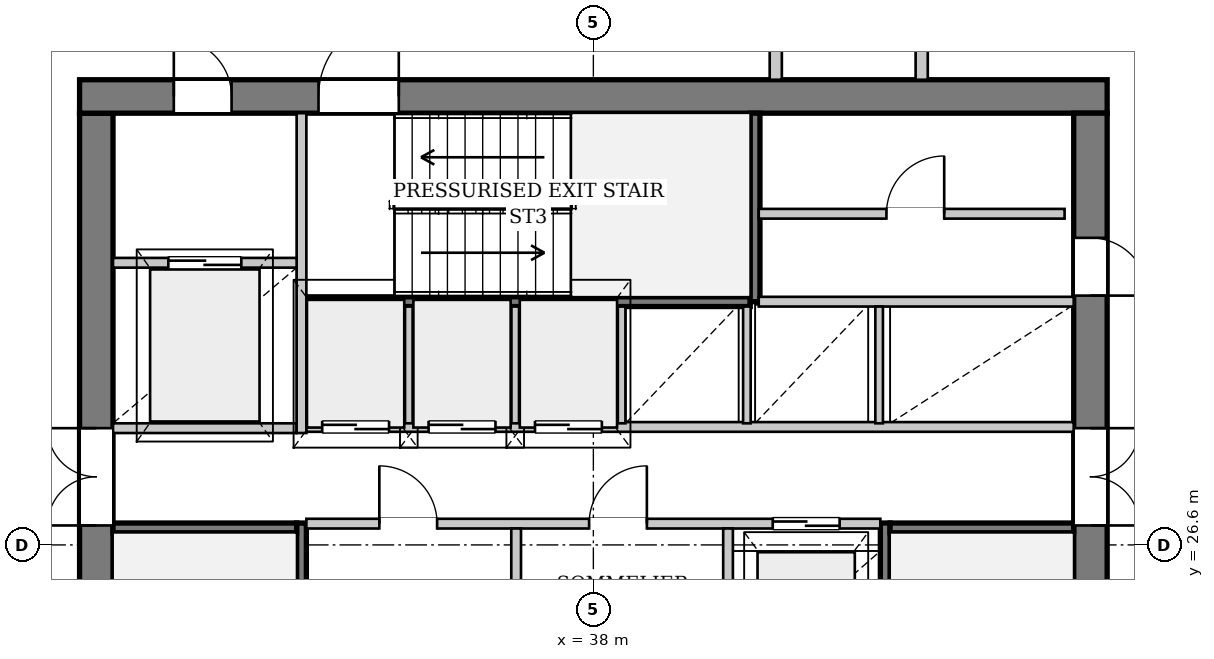
"""IFC4 building model, lengths in metres.
Left out: names, types, materials, properties, quantities, classifications, styles, units other than length and angle.
Written with IfcOpenShell. Run it as: python <this file> out.ifc"""

import sys

from ifc_helpers import new_model, si_unit, direction, frame, frame_2d, origin, place, context, subcontext, project, spatial, rectangle, extrude, source, transform, mapped, element, fill, save


model = new_model("IFC4")
c1 = context("Model", 3, precision=1e-05, world=origin(), true_north=direction((0.0, 1.0)))
c2 = subcontext(c1, "Body", "Model", "MODEL_VIEW")
j1 = project(units=[si_unit("LENGTHUNIT", "METRE"), si_unit("PLANEANGLEUNIT", "RADIAN")], contexts=[c1])
p1 = place(None, origin())
s1 = spatial("IfcSite", under=j1, at=p1, CompositionType="ELEMENT")
p2 = place(p1, origin())
s2 = spatial("IfcBuilding", under=s1, at=p2, CompositionType="ELEMENT")
p3 = place(p2, frame((0.0, 0.0, 146.6)))
s3 = spatial("IfcBuildingStorey", under=s2, at=p3, CompositionType="ELEMENT", Elevation=146.6)
p4 = place(p3, frame((29.825, 19.5, 0.0), z_axis=(0.0, 0.0, 1.0), x_axis=(0.0, 1.0, 0.0)))
e1 = element("IfcWall", 1, at=p4, inside=s3, PredefinedType="SHEAR", context=c2, shape_type="SweptSolid", body=[
    extrude(rectangle(XDim=14.2, YDim=0.55, at=frame_2d((7.1, 0.0))), origin(), (0.0, 0.0, 1.0), 3.3),
])
p5 = place(p4, frame((7.42, 0.0, 0.0)))
e2 = element("IfcOpeningElement", 2, at=p5, cuts=e1, PredefinedType="OPENING", context=c2, shape_type="SweptSolid", body=[
    extrude(rectangle(XDim=1.6, YDim=2.2, at=frame_2d((0.8, 1.1))), frame((0.0, 0.285, 0.0), z_axis=(0.0, -1.0, 0.0), x_axis=(1.0, 0.0, 0.0)), (0.0, 0.0, 1.0), 0.57),
])
p6 = place(p3, frame((29.55, 33.975, 0.0), z_axis=(0.0, 0.0, 1.0), x_axis=(1.0, 0.0, 0.0)))
e3 = element("IfcWall", 3, at=p6, inside=s3, PredefinedType="SHEAR", context=c2, shape_type="SweptSolid", body=[
    extrude(rectangle(XDim=16.9, YDim=0.55, at=frame_2d((8.45, 0.0))), origin(), (0.0, 0.0, 1.0), 3.3),
])
p7 = place(p6, frame((1.55, 0.0, 0.0)))
e4 = element("IfcOpeningElement", 4, at=p7, cuts=e3, PredefinedType="OPENING", context=c2, shape_type="SweptSolid", body=[
    extrude(rectangle(XDim=0.95, YDim=2.1, at=frame_2d((0.475, 1.05))), frame((0.0, 0.285, 0.0), z_axis=(0.0, -1.0, 0.0), x_axis=(1.0, 0.0, 0.0)), (0.0, 0.0, 1.0), 0.57),
])
p8 = place(p6, frame((3.93, 0.0, 0.0)))
e5 = element("IfcOpeningElement", 5, at=p8, cuts=e3, PredefinedType="OPENING", context=c2, shape_type="SweptSolid", body=[
    extrude(rectangle(XDim=1.32, YDim=2.2, at=frame_2d((0.66, 1.1))), frame((0.0, 0.285, 0.0), z_axis=(0.0, -1.0, 0.0), x_axis=(1.0, 0.0, 0.0)), (0.0, 0.0, 1.0), 0.57),
])
p9 = place(p3, frame((46.175, 33.7, 0.0), z_axis=(0.0, 0.0, 1.0), x_axis=(0.0, -1.0, 0.0)))
e6 = element("IfcWall", 6, at=p9, inside=s3, PredefinedType="SHEAR", context=c2, shape_type="SweptSolid", body=[
    extrude(rectangle(XDim=14.2, YDim=0.55, at=frame_2d((7.1, 0.0))), origin(), (0.0, 0.0, 1.0), 3.3),
])
p10 = place(p9, frame((5.18, 0.0, 0.0)))
e7 = element("IfcOpeningElement", 7, at=p10, cuts=e6, PredefinedType="OPENING", context=c2, shape_type="SweptSolid", body=[
    extrude(rectangle(XDim=1.6, YDim=2.2, at=frame_2d((0.8, 1.1))), frame((0.0, 0.285, 0.0), z_axis=(0.0, -1.0, 0.0), x_axis=(1.0, 0.0, 0.0)), (0.0, 0.0, 1.0), 0.57),
])
p11 = place(p9, frame((2.05, 0.0, 0.0)))
e8 = element("IfcOpeningElement", 8, at=p11, cuts=e6, PredefinedType="OPENING", context=c2, shape_type="SweptSolid", body=[
    extrude(rectangle(XDim=0.95, YDim=2.1, at=frame_2d((0.475, 1.05))), frame((0.0, 0.285, 0.0), z_axis=(0.0, -1.0, 0.0), x_axis=(1.0, 0.0, 0.0)), (0.0, 0.0, 1.0), 0.57),
])
p12 = place(p3, frame((33.2, 19.5, 0.0), z_axis=(0.0, 0.0, 1.0), x_axis=(0.0, 1.0, 0.0)))
e9 = element("IfcWall", 9, at=p12, inside=s3, PredefinedType="PARTITIONING", context=c2, shape_type="SweptSolid", body=[
    extrude(rectangle(XDim=7.46, YDim=0.16, at=frame_2d((3.73, 0.0))), origin(), (0.0, 0.0, 1.0), 3.3),
])
p13 = place(p12, frame((0.08, 0.0, 0.0)))
e10 = element("IfcOpeningElement", 10, at=p13, cuts=e9, PredefinedType="OPENING", context=c2, shape_type="SweptSolid", body=[
    extrude(rectangle(XDim=1.32, YDim=2.2, at=frame_2d((0.66, 1.1))), frame((0.0, 0.09, 0.0), z_axis=(0.0, -1.0, 0.0), x_axis=(1.0, 0.0, 0.0)), (0.0, 0.0, 1.0), 0.18),
])
p14 = place(p3, frame((30.1, 26.88, 0.0), z_axis=(0.0, 0.0, 1.0), x_axis=(1.0, 0.0, 0.0)))
e11 = element("IfcWall", 11, at=p14, inside=s3, PredefinedType="PARTITIONING", context=c2, shape_type="SweptSolid", body=[
    extrude(rectangle(XDim=3.02, YDim=0.16, at=frame_2d((1.51, 0.0))), origin(), (0.0, 0.0, 1.0), 3.3),
])
p15 = place(p3, frame((42.8, 26.96, 0.0), z_axis=(0.0, 0.0, 1.0), x_axis=(0.0, -1.0, 0.0)))
e12 = element("IfcWall", 12, at=p15, inside=s3, PredefinedType="PARTITIONING", context=c2, shape_type="SweptSolid", body=[
    extrude(rectangle(XDim=7.46, YDim=0.16, at=frame_2d((3.73, 0.0))), origin(), (0.0, 0.0, 1.0), 3.3),
])
p16 = place(p15, frame((6.06, 0.0, 0.0)))
e13 = element("IfcOpeningElement", 13, at=p16, cuts=e12, PredefinedType="OPENING", context=c2, shape_type="SweptSolid", body=[
    extrude(rectangle(XDim=1.32, YDim=2.2, at=frame_2d((0.66, 1.1))), frame((0.0, 0.09, 0.0), z_axis=(0.0, -1.0, 0.0), x_axis=(1.0, 0.0, 0.0)), (0.0, 0.0, 1.0), 0.18),
])
p17 = place(p3, frame((42.88, 26.88, 0.0), z_axis=(0.0, 0.0, 1.0), x_axis=(1.0, 0.0, 0.0)))
e14 = element("IfcWall", 14, at=p17, inside=s3, PredefinedType="PARTITIONING", context=c2, shape_type="SweptSolid", body=[
    extrude(rectangle(XDim=3.02, YDim=0.16, at=frame_2d((1.51, 0.0))), origin(), (0.0, 0.0, 1.0), 3.3),
])
p18 = place(p3, frame((33.28, 30.6, 0.0), z_axis=(0.0, 0.0, 1.0), x_axis=(1.0, 0.0, 0.0)))
e15 = element("IfcWall", 15, at=p18, inside=s3, PredefinedType="PARTITIONING", context=c2, shape_type="SweptSolid", body=[
    extrude(rectangle(XDim=7.3, YDim=0.16, at=frame_2d((3.65, 0.0))), origin(), (0.0, 0.0, 1.0), 3.3),
])
p19 = place(p3, frame((40.66, 30.6, 0.0), z_axis=(0.0, 0.0, 1.0), x_axis=(0.0, 1.0, 0.0)))
e16 = element("IfcWall", 16, at=p19, inside=s3, PredefinedType="PARTITIONING", context=c2, shape_type="SweptSolid", body=[
    extrude(rectangle(XDim=3.1, YDim=0.16, at=frame_2d((1.55, 0.0))), origin(), (0.0, 0.0, 1.0), 3.3),
])
p20 = place(p3, frame((30.1, 28.52, 0.0), z_axis=(0.0, 0.0, 1.0), x_axis=(1.0, 0.0, 0.0)))
e17 = element("IfcWall", 17, at=p20, inside=s3, PredefinedType="PARTITIONING", context=c2, shape_type="SweptSolid", body=[
    extrude(rectangle(XDim=3.02, YDim=0.16, at=frame_2d((1.51, 0.0))), origin(), (0.0, 0.0, 1.0), 3.3),
])
p21 = place(p3, frame((33.2, 28.44, 0.0), z_axis=(0.0, 0.0, 1.0), x_axis=(0.0, 1.0, 0.0)))
e18 = element("IfcWall", 18, at=p21, inside=s3, PredefinedType="PARTITIONING", context=c2, shape_type="SweptSolid", body=[
    extrude(rectangle(XDim=5.26, YDim=0.16, at=frame_2d((2.63, 0.0))), origin(), (0.0, 0.0, 1.0), 3.3),
])
p22 = place(p3, frame((30.1, 31.24, 0.0), z_axis=(0.0, 0.0, 1.0), x_axis=(1.0, 0.0, 0.0)))
e19 = element("IfcWall", 19, at=p22, inside=s3, PredefinedType="PARTITIONING", context=c2, shape_type="SweptSolid", body=[
    extrude(rectangle(XDim=3.02, YDim=0.16, at=frame_2d((1.51, 0.0))), origin(), (0.0, 0.0, 1.0), 3.3),
])
p23 = place(p22, frame((0.91, 0.0, 0.0)))
e20 = element("IfcOpeningElement", 20, at=p23, cuts=e19, PredefinedType="OPENING", context=c2, shape_type="SweptSolid", body=[
    extrude(rectangle(XDim=1.2, YDim=2.2, at=frame_2d((0.6, 1.1))), frame((0.0, 0.09, 0.0), z_axis=(0.0, -1.0, 0.0), x_axis=(1.0, 0.0, 0.0)), (0.0, 0.0, 1.0), 0.18),
])
p24 = place(p3, frame((33.28, 26.95, 0.0), z_axis=(0.0, 0.0, 1.0), x_axis=(1.0, 0.0, 0.0)))
e21 = element("IfcWall", 21, at=p24, inside=s3, PredefinedType="PARTITIONING", context=c2, shape_type="SweptSolid", body=[
    extrude(rectangle(XDim=9.44, YDim=0.16, at=frame_2d((4.72, 0.0))), origin(), (0.0, 0.0, 1.0), 3.3),
])
p25 = place(p24, frame((1.2, 0.0, 0.0)))
e22 = element("IfcOpeningElement", 22, at=p25, cuts=e21, PredefinedType="OPENING", context=c2, shape_type="SweptSolid", body=[
    extrude(rectangle(XDim=0.95, YDim=2.1, at=frame_2d((0.475, 1.05))), frame((0.0, 0.09, 0.0), z_axis=(0.0, -1.0, 0.0), x_axis=(1.0, 0.0, 0.0)), (0.0, 0.0, 1.0), 0.18),
])
p26 = place(p24, frame((4.65, 0.0, 0.0)))
e23 = element("IfcOpeningElement", 23, at=p26, cuts=e21, PredefinedType="OPENING", context=c2, shape_type="SweptSolid", body=[
    extrude(rectangle(XDim=0.95, YDim=2.1, at=frame_2d((0.475, 1.05))), frame((0.0, 0.09, 0.0), z_axis=(0.0, -1.0, 0.0), x_axis=(1.0, 0.0, 0.0)), (0.0, 0.0, 1.0), 0.18),
])
p27 = place(p24, frame((7.67, 0.0, 0.0)))
e24 = element("IfcOpeningElement", 24, at=p27, cuts=e21, PredefinedType="OPENING", context=c2, shape_type="SweptSolid", body=[
    extrude(rectangle(XDim=1.1, YDim=2.2, at=frame_2d((0.55, 1.1))), frame((0.0, 0.09, 0.0), z_axis=(0.0, -1.0, 0.0), x_axis=(1.0, 0.0, 0.0)), (0.0, 0.0, 1.0), 0.18),
])
for number, where, z_axis, x_axis in (
    (25, (36.73, 24.56, 0.0), (0.0, 0.0, 1.0), (0.0, 1.0, 0.0)),
    (26, (40.215, 24.56, 0.0), (0.0, 0.0, 1.0), (0.0, 1.0, 0.0)),
):
    element("IfcWall", number, at=place(p3, frame(where, z_axis=z_axis, x_axis=x_axis)), inside=s3, PredefinedType="PARTITIONING", context=c2, shape_type="SweptSolid", body=[
        extrude(rectangle(XDim=2.31, YDim=0.16, at=frame_2d((1.155, 0.0))), origin(), (0.0, 0.0, 1.0), 3.3),
    ])
p28 = place(p3, frame((33.28, 28.54, 0.0), z_axis=(0.0, 0.0, 1.0), x_axis=(1.0, 0.0, 0.0)))
e27 = element("IfcWall", 27, at=p28, inside=s3, PredefinedType="PARTITIONING", context=c2, shape_type="SweptSolid", body=[
    extrude(rectangle(XDim=12.62, YDim=0.16, at=frame_2d((6.31, 0.0))), origin(), (0.0, 0.0, 1.0), 3.3),
])
p29 = place(p28, frame((0.26, 0.0, 0.0)))
e28 = element("IfcOpeningElement", 28, at=p29, cuts=e27, PredefinedType="OPENING", context=c2, shape_type="SweptSolid", body=[
    extrude(rectangle(XDim=1.1, YDim=2.2, at=frame_2d((0.55, 1.1))), frame((0.0, 0.09, 0.0), z_axis=(0.0, -1.0, 0.0), x_axis=(1.0, 0.0, 0.0)), (0.0, 0.0, 1.0), 0.18),
])
p30 = place(p28, frame((2.01, 0.0, 0.0)))
e29 = element("IfcOpeningElement", 29, at=p30, cuts=e27, PredefinedType="OPENING", context=c2, shape_type="SweptSolid", body=[
    extrude(rectangle(XDim=1.1, YDim=2.2, at=frame_2d((0.55, 1.1))), frame((0.0, 0.09, 0.0), z_axis=(0.0, -1.0, 0.0), x_axis=(1.0, 0.0, 0.0)), (0.0, 0.0, 1.0), 0.18),
])
p31 = place(p28, frame((3.76, 0.0, 0.0)))
e30 = element("IfcOpeningElement", 30, at=p31, cuts=e27, PredefinedType="OPENING", context=c2, shape_type="SweptSolid", body=[
    extrude(rectangle(XDim=1.1, YDim=2.2, at=frame_2d((0.55, 1.1))), frame((0.0, 0.09, 0.0), z_axis=(0.0, -1.0, 0.0), x_axis=(1.0, 0.0, 0.0)), (0.0, 0.0, 1.0), 0.18),
])
p32 = place(p3, frame((40.72, 30.6, 0.0), z_axis=(0.0, 0.0, 1.0), x_axis=(1.0, 0.0, 0.0)))
e31 = element("IfcWall", 31, at=p32, inside=s3, PredefinedType="PARTITIONING", context=c2, shape_type="SweptSolid", body=[
    extrude(rectangle(XDim=5.18, YDim=0.16, at=frame_2d((2.59, 0.0))), origin(), (0.0, 0.0, 1.0), 3.3),
])
for number, where, z_axis, x_axis in (
    (32, (34.965, 28.6, 0.0), (0.0, 0.0, 1.0), (0.0, 1.0, 0.0)),
    (33, (36.715, 28.6, 0.0), (0.0, 0.0, 1.0), (0.0, 1.0, 0.0)),
    (34, (38.465, 28.6, 0.0), (0.0, 0.0, 1.0), (0.0, 1.0, 0.0)),
    (35, (40.525, 28.6, 0.0), (0.0, 0.0, 1.0), (0.0, 1.0, 0.0)),
    (36, (42.7, 28.6, 0.0), (0.0, 0.0, 1.0), (0.0, 1.0, 0.0)),
):
    element("IfcWall", number, at=place(p3, frame(where, z_axis=z_axis, x_axis=x_axis)), inside=s3, PredefinedType="PARTITIONING", context=c2, shape_type="SweptSolid", body=[
        extrude(rectangle(XDim=1.92, YDim=0.125, at=frame_2d((0.96, 0.0))), origin(), (0.0, 0.0, 1.0), 3.3),
    ])
p33 = place(p3, frame((40.72, 32.046, 0.0), z_axis=(0.0, 0.0, 1.0), x_axis=(1.0, 0.0, 0.0)))
e37 = element("IfcWall", 37, at=p33, inside=s3, PredefinedType="PARTITIONING", context=c2, shape_type="SweptSolid", body=[
    extrude(rectangle(XDim=5.03, YDim=0.16, at=frame_2d((2.515, 0.0))), origin(), (0.0, 0.0, 1.0), 3.3),
])
p34 = place(p33, frame((2.1, 0.0, 0.0)))
e38 = element("IfcOpeningElement", 38, at=p34, cuts=e37, PredefinedType="OPENING", context=c2, shape_type="SweptSolid", body=[
    extrude(rectangle(XDim=0.95, YDim=2.1, at=frame_2d((0.475, 1.05))), frame((0.0, 0.09, 0.0), z_axis=(0.0, -1.0, 0.0), x_axis=(1.0, 0.0, 0.0)), (0.0, 0.0, 1.0), 0.18),
])
for number, where, z_axis, x_axis in (
    (39, (41.0, 34.25, 0.0), (0.0, 0.0, 1.0), (0.0, 1.0, 0.0)),
    (40, (43.4, 34.25, 0.0), (0.0, 0.0, 1.0), (0.0, 1.0, 0.0)),
):
    element("IfcWall", number, at=place(p3, frame(where, z_axis=z_axis, x_axis=x_axis)), inside=s3, PredefinedType="PARTITIONING", context=c2, shape_type="SweptSolid", body=[
        extrude(rectangle(XDim=1.95, YDim=0.2, at=frame_2d((0.975, 0.0))), origin(), (0.0, 0.0, 1.0), 3.3),
    ])
m1 = source(origin(), c2, "Body", "SweptSolid", [
    extrude(rectangle(XDim=1.6, YDim=2.2, at=frame_2d((0.8, 1.1))), frame((0.0, 0.025, 0.0), z_axis=(0.0, -1.0, 0.0), x_axis=(1.0, 0.0, 0.0)), (0.0, 0.0, 1.0), 0.05),
])
p35 = place(p5, origin())
e41 = element("IfcDoor", 41, at=p35, inside=s3, OperationType="DOUBLE_DOOR_SINGLE_SWING", PredefinedType="DOOR", context=c2, shape_type="MappedRepresentation", body=[
    mapped(m1, transform((0.0, 0.0, 0.0), x_axis=(1.0, 0.0, 0.0), y_axis=(0.0, 1.0, 0.0), z_axis=(0.0, 0.0, 1.0), scale=1.0)),
])
fill(e2, e41)
m2 = source(origin(), c2, "Body", "SweptSolid", [
    extrude(rectangle(XDim=0.95, YDim=2.1, at=frame_2d((0.475, 1.05))), frame((0.0, 0.025, 0.0), z_axis=(0.0, -1.0, 0.0), x_axis=(1.0, 0.0, 0.0)), (0.0, 0.0, 1.0), 0.05),
])
p36 = place(p7, origin())
e42 = element("IfcDoor", 42, at=p36, inside=s3, OperationType="SINGLE_SWING_LEFT", PredefinedType="DOOR", context=c2, shape_type="MappedRepresentation", body=[
    mapped(m2, transform((0.0, 0.0, 0.0), x_axis=(1.0, 0.0, 0.0), y_axis=(0.0, 1.0, 0.0), z_axis=(0.0, 0.0, 1.0), scale=1.0)),
])
fill(e4, e42)
m3 = source(origin(), c2, "Body", "SweptSolid", [
    extrude(rectangle(XDim=1.32, YDim=2.2, at=frame_2d((0.66, 1.1))), frame((0.0, 0.025, 0.0), z_axis=(0.0, -1.0, 0.0), x_axis=(1.0, 0.0, 0.0)), (0.0, 0.0, 1.0), 0.05),
])
p37 = place(p8, origin())
e43 = element("IfcDoor", 43, at=p37, inside=s3, OperationType="SINGLE_SWING_RIGHT", PredefinedType="DOOR", context=c2, shape_type="MappedRepresentation", body=[
    mapped(m3, transform((0.0, 0.0, 0.0), x_axis=(1.0, 0.0, 0.0), y_axis=(0.0, 1.0, 0.0), z_axis=(0.0, 0.0, 1.0), scale=1.0)),
])
fill(e5, e43)
p38 = place(p10, origin())
e44 = element("IfcDoor", 44, at=p38, inside=s3, OperationType="DOUBLE_DOOR_SINGLE_SWING", PredefinedType="DOOR", context=c2, shape_type="MappedRepresentation", body=[
    mapped(m1, transform((0.0, 0.0, 0.0), x_axis=(1.0, 0.0, 0.0), y_axis=(0.0, 1.0, 0.0), z_axis=(0.0, 0.0, 1.0), scale=1.0)),
])
fill(e7, e44)
m4 = source(origin(), c2, "Body", "SweptSolid", [
    extrude(rectangle(XDim=1.2, YDim=2.2, at=frame_2d((0.6, 1.1))), frame((0.0, 0.025, 0.0), z_axis=(0.0, -1.0, 0.0), x_axis=(1.0, 0.0, 0.0)), (0.0, 0.0, 1.0), 0.05),
])
p39 = place(p23, origin())
e45 = element("IfcDoor", 45, at=p39, inside=s3, OperationType="DOUBLE_DOOR_SLIDING", PredefinedType="DOOR", context=c2, shape_type="MappedRepresentation", body=[
    mapped(m4, transform((0.0, 0.0, 0.0), x_axis=(1.0, 0.0, 0.0), y_axis=(0.0, 1.0, 0.0), z_axis=(0.0, 0.0, 1.0), scale=1.0)),
])
fill(e20, e45)
p40 = place(p25, origin())
e46 = element("IfcDoor", 46, at=p40, inside=s3, OperationType="SINGLE_SWING_LEFT", PredefinedType="DOOR", context=c2, shape_type="MappedRepresentation", body=[
    mapped(m2, transform((0.0, 0.0, 0.0), x_axis=(1.0, 0.0, 0.0), y_axis=(0.0, 1.0, 0.0), z_axis=(0.0, 0.0, 1.0), scale=1.0)),
])
fill(e22, e46)
p41 = place(p26, origin())
e47 = element("IfcDoor", 47, at=p41, inside=s3, OperationType="SINGLE_SWING_RIGHT", PredefinedType="DOOR", context=c2, shape_type="MappedRepresentation", body=[
    mapped(m2, transform((0.0, 0.0, 0.0), x_axis=(1.0, 0.0, 0.0), y_axis=(0.0, 1.0, 0.0), z_axis=(0.0, 0.0, 1.0), scale=1.0)),
])
fill(e23, e47)
m5 = source(origin(), c2, "Body", "SweptSolid", [
    extrude(rectangle(XDim=1.1, YDim=2.2, at=frame_2d((0.55, 1.1))), frame((0.0, 0.025, 0.0), z_axis=(0.0, -1.0, 0.0), x_axis=(1.0, 0.0, 0.0)), (0.0, 0.0, 1.0), 0.05),
])
p42 = place(p27, origin())
e48 = element("IfcDoor", 48, at=p42, inside=s3, OperationType="DOUBLE_DOOR_SLIDING", PredefinedType="DOOR", context=c2, shape_type="MappedRepresentation", body=[
    mapped(m5, transform((0.0, 0.0, 0.0), x_axis=(1.0, 0.0, 0.0), y_axis=(0.0, 1.0, 0.0), z_axis=(0.0, 0.0, 1.0), scale=1.0)),
])
fill(e24, e48)
p43 = place(p29, origin())
e49 = element("IfcDoor", 49, at=p43, inside=s3, OperationType="DOUBLE_DOOR_SLIDING", PredefinedType="DOOR", context=c2, shape_type="MappedRepresentation", body=[
    mapped(m5, transform((0.0, 0.0, 0.0), x_axis=(1.0, 0.0, 0.0), y_axis=(0.0, 1.0, 0.0), z_axis=(0.0, 0.0, 1.0), scale=1.0)),
])
fill(e28, e49)
p44 = place(p30, origin())
e50 = element("IfcDoor", 50, at=p44, inside=s3, OperationType="DOUBLE_DOOR_SLIDING", PredefinedType="DOOR", context=c2, shape_type="MappedRepresentation", body=[
    mapped(m5, transform((0.0, 0.0, 0.0), x_axis=(1.0, 0.0, 0.0), y_axis=(0.0, 1.0, 0.0), z_axis=(0.0, 0.0, 1.0), scale=1.0)),
])
fill(e29, e50)
p45 = place(p31, origin())
e51 = element("IfcDoor", 51, at=p45, inside=s3, OperationType="DOUBLE_DOOR_SLIDING", PredefinedType="DOOR", context=c2, shape_type="MappedRepresentation", body=[
    mapped(m5, transform((0.0, 0.0, 0.0), x_axis=(1.0, 0.0, 0.0), y_axis=(0.0, 1.0, 0.0), z_axis=(0.0, 0.0, 1.0), scale=1.0)),
])
fill(e30, e51)
p46 = place(p34, origin())
e52 = element("IfcDoor", 52, at=p46, inside=s3, OperationType="SINGLE_SWING_RIGHT", PredefinedType="DOOR", context=c2, shape_type="MappedRepresentation", body=[
    mapped(m2, transform((0.0, 0.0, 0.0), x_axis=(1.0, 0.0, 0.0), y_axis=(0.0, 1.0, 0.0), z_axis=(0.0, 0.0, 1.0), scale=1.0)),
])
fill(e38, e52)
p47 = place(p11, origin())
e53 = element("IfcDoor", 53, at=p47, inside=s3, OperationType="SINGLE_SWING_RIGHT", PredefinedType="DOOR", context=c2, shape_type="MappedRepresentation", body=[
    mapped(m2, transform((0.0, 0.0, 0.0), x_axis=(1.0, 0.0, 0.0), y_axis=(0.0, 1.0, 0.0), z_axis=(0.0, 0.0, 1.0), scale=1.0)),
])
fill(e8, e53)
save(model, sys.argv[1])
